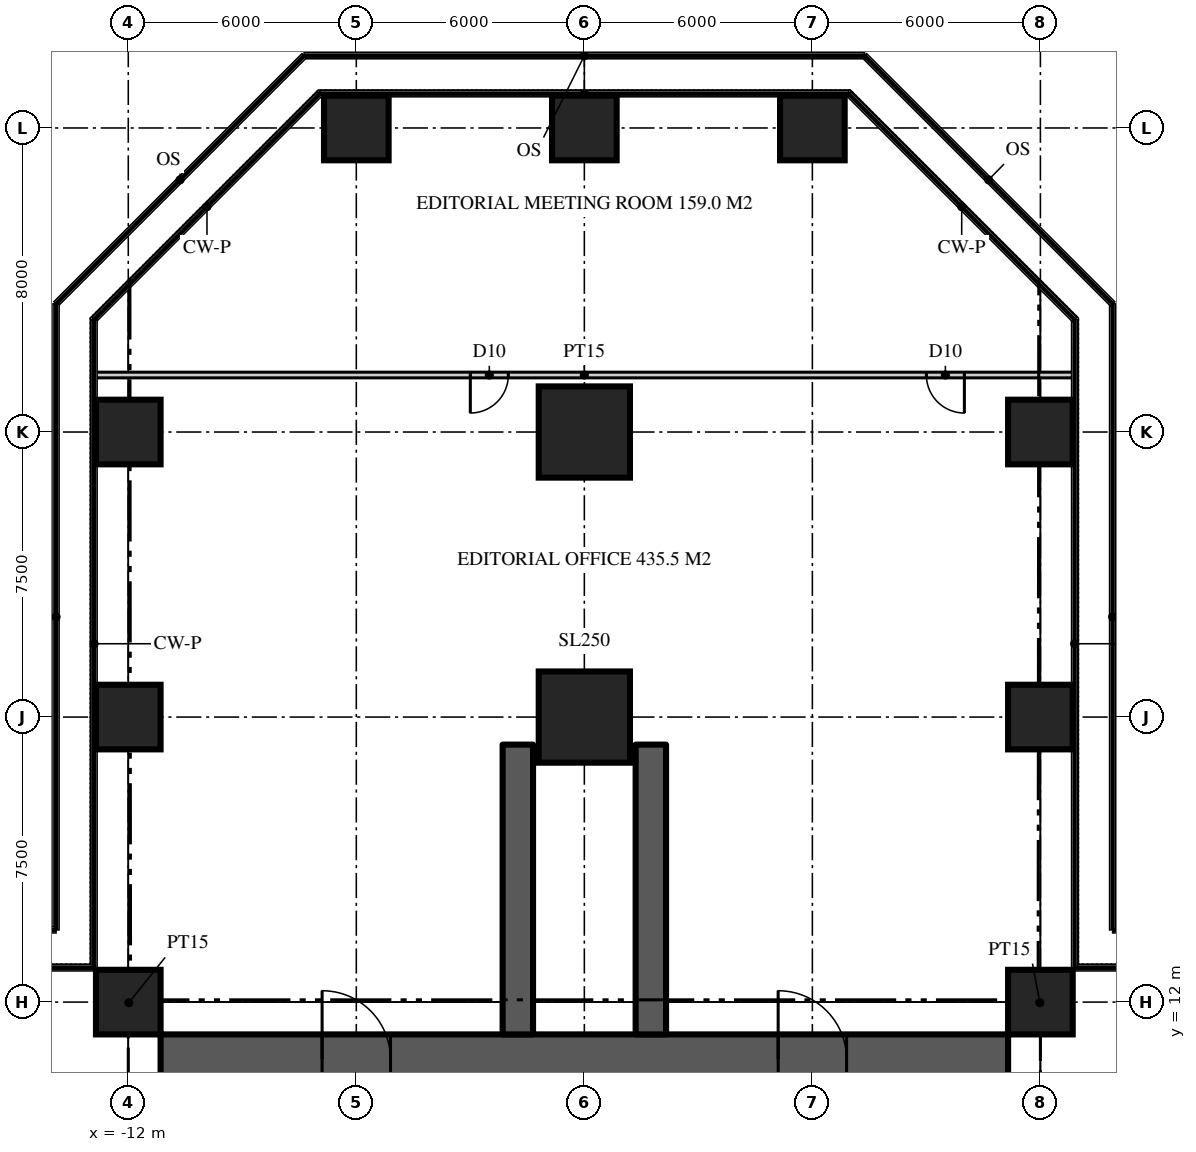
"""IFC4 building model, lengths in metres.
Left out: names, types, materials, properties, quantities, classifications, styles, units other than length and angle.
Written with IfcOpenShell. Run it as: python <this file> out.ifc"""

import sys

from ifc_helpers import new_model, si_unit, direction, frame, frame_2d, origin, origin_2d, place, context, subcontext, project, spatial, rectangle, extrude, element, fill, save


model = new_model("IFC4")
c1 = context("Model", 3, precision=1e-05, world=origin(), true_north=direction((0.0, 1.0)))
c2 = subcontext(c1, "Body", "Model", "MODEL_VIEW")
j1 = project(units=[si_unit("LENGTHUNIT", "METRE"), si_unit("PLANEANGLEUNIT", "RADIAN")], contexts=[c1])
p1 = place(None, origin())
s1 = spatial("IfcSite", under=j1, at=p1, CompositionType="ELEMENT")
p2 = place(p1, origin())
s2 = spatial("IfcBuilding", under=s1, at=p2, CompositionType="ELEMENT")
p3 = place(p2, frame((0.0, 0.0, 33.0)))
s3 = spatial("IfcBuildingStorey", under=s2, at=p3, CompositionType="ELEMENT", Elevation=33.0)
p4 = place(p3, frame((-11.15, 10.5, 0.0), z_axis=(0.0, 0.0, 1.0), x_axis=(1.0, 0.0, 0.0)))
e1 = element("IfcWall", 1, at=p4, inside=s3, PredefinedType="SHEAR", context=c2, shape_type="SweptSolid", body=[
    extrude(rectangle(XDim=22.3, YDim=1.3, at=frame_2d((11.15, 0.0))), origin(), (0.0, 0.0, 1.0), 4.5),
])
p5 = place(p4, frame((4.25, 0.0, 0.0)))
e2 = element("IfcOpeningElement", 2, at=p5, cuts=e1, PredefinedType="OPENING", context=c2, shape_type="SweptSolid", body=[
    extrude(rectangle(XDim=1.8, YDim=2.2, at=frame_2d((0.9, 1.1))), frame((0.0, 0.66, 0.0), z_axis=(0.0, -1.0, 0.0), x_axis=(1.0, 0.0, 0.0)), (0.0, 0.0, 1.0), 1.32),
])
p6 = place(p4, frame((16.25, 0.0, 0.0)))
e3 = element("IfcOpeningElement", 3, at=p6, cuts=e1, PredefinedType="OPENING", context=c2, shape_type="SweptSolid", body=[
    extrude(rectangle(XDim=1.8, YDim=2.2, at=frame_2d((0.9, 1.1))), frame((0.0, 0.66, 0.0), z_axis=(0.0, -1.0, 0.0), x_axis=(1.0, 0.0, 0.0)), (0.0, 0.0, 1.0), 1.32),
])
for number, where, z_axis, x_axis in (
    (4, (1.75, 11.15, 0.0), (0.0, 0.0, 1.0), (0.0, 1.0, 0.0)),
    (5, (-1.75, 11.15, 0.0), (0.0, 0.0, 1.0), (0.0, 1.0, 0.0)),
):
    element("IfcWall", number, at=place(p3, frame(where, z_axis=z_axis, x_axis=x_axis)), inside=s3, PredefinedType="SHEAR", context=c2, shape_type="SweptSolid", body=[
        extrude(rectangle(XDim=7.625, YDim=0.8, at=frame_2d((3.812, 0.0))), origin(), (0.0, 0.0, 1.0), 4.5),
    ])
for number, where, z_axis, x_axis in (
    (6, (-12.0, 12.0, 0.0), (0.0, 0.0, 1.0), (1.0, 0.0, 0.0)),
    (7, (12.0, 12.0, 0.0), (0.0, 0.0, 1.0), (1.0, 0.0, 0.0)),
    (8, (-12.0, 19.5, 0.0), (0.0, 0.0, 1.0), (1.0, 0.0, 0.0)),
):
    element("IfcColumn", number, at=place(p3, frame(where, z_axis=z_axis, x_axis=x_axis)), inside=s3, PredefinedType="COLUMN", context=c2, shape_type="SweptSolid", body=[
        extrude(rectangle(XDim=1.7, YDim=1.7, at=origin_2d()), origin(), (0.0, 0.0, 1.0), 4.5),
    ])
p7 = place(p3, frame((0.0, 19.5, 0.0), z_axis=(0.0, 0.0, 1.0), x_axis=(1.0, 0.0, 0.0)))
e9 = element("IfcColumn", 9, at=p7, inside=s3, PredefinedType="COLUMN", context=c2, shape_type="SweptSolid", body=[
    extrude(rectangle(XDim=2.4, YDim=2.4, at=origin_2d()), origin(), (0.0, 0.0, 1.0), 4.5),
])
for number, where, z_axis, x_axis in (
    (10, (12.0, 19.5, 0.0), (0.0, 0.0, 1.0), (1.0, 0.0, 0.0)),
    (11, (-12.0, 27.0, 0.0), (0.0, 0.0, 1.0), (1.0, 0.0, 0.0)),
):
    element("IfcColumn", number, at=place(p3, frame(where, z_axis=z_axis, x_axis=x_axis)), inside=s3, PredefinedType="COLUMN", context=c2, shape_type="SweptSolid", body=[
        extrude(rectangle(XDim=1.7, YDim=1.7, at=origin_2d()), origin(), (0.0, 0.0, 1.0), 4.5),
    ])
p8 = place(p3, frame((0.0, 27.0, 0.0), z_axis=(0.0, 0.0, 1.0), x_axis=(1.0, 0.0, 0.0)))
e12 = element("IfcColumn", 12, at=p8, inside=s3, PredefinedType="COLUMN", context=c2, shape_type="SweptSolid", body=[
    extrude(rectangle(XDim=2.4, YDim=2.4, at=origin_2d()), origin(), (0.0, 0.0, 1.0), 4.5),
])
for number, where, z_axis, x_axis in (
    (13, (12.0, 27.0, 0.0), (0.0, 0.0, 1.0), (1.0, 0.0, 0.0)),
    (14, (-6.0, 35.0, 0.0), (0.0, 0.0, 1.0), (1.0, 0.0, 0.0)),
    (15, (0.0, 35.0, 0.0), (0.0, 0.0, 1.0), (1.0, 0.0, 0.0)),
    (16, (6.0, 35.0, 0.0), (0.0, 0.0, 1.0), (1.0, 0.0, 0.0)),
):
    element("IfcColumn", number, at=place(p3, frame(where, z_axis=z_axis, x_axis=x_axis)), inside=s3, PredefinedType="COLUMN", context=c2, shape_type="SweptSolid", body=[
        extrude(rectangle(XDim=1.7, YDim=1.7, at=origin_2d()), origin(), (0.0, 0.0, 1.0), 4.5),
    ])
p9 = place(p3, frame((12.875, 28.5, 0.0), z_axis=(0.0, 0.0, 1.0), x_axis=(-1.0, 0.0, 0.0)))
e17 = element("IfcWall", 17, at=p9, inside=s3, PredefinedType="PARTITIONING", context=c2, shape_type="SweptSolid", body=[
    extrude(rectangle(XDim=25.75, YDim=0.15, at=frame_2d((12.875, 0.0))), origin(), (0.0, 0.0, 1.0), 4.25),
])
p10 = place(p9, frame((14.875, 0.0, 0.0)))
e18 = element("IfcOpeningElement", 18, at=p10, cuts=e17, PredefinedType="OPENING", context=c2, shape_type="SweptSolid", body=[
    extrude(rectangle(XDim=1.0, YDim=2.2, at=frame_2d((0.5, 1.1))), frame((0.0, 0.085, 0.0), z_axis=(0.0, -1.0, 0.0), x_axis=(1.0, 0.0, 0.0)), (0.0, 0.0, 1.0), 0.17),
])
p11 = place(p9, frame((2.875, 0.0, 0.0)))
e19 = element("IfcOpeningElement", 19, at=p11, cuts=e17, PredefinedType="OPENING", context=c2, shape_type="SweptSolid", body=[
    extrude(rectangle(XDim=1.0, YDim=2.2, at=frame_2d((0.5, 1.1))), frame((0.0, 0.085, 0.0), z_axis=(0.0, -1.0, 0.0), x_axis=(1.0, 0.0, 0.0)), (0.0, 0.0, 1.0), 0.17),
])
for number, where, z_axis, x_axis in (
    (20, (11.15, 11.15, 0.0), (0.0, 0.0, 1.0), (0.707, 0.707, 0.0)),
    (21, (-11.15, 11.15, 0.0), (0.0, 0.0, 1.0), (-0.707, 0.707, 0.0)),
):
    element("IfcWall", number, at=place(p3, frame(where, z_axis=z_axis, x_axis=x_axis)), inside=s3, PredefinedType="PARTITIONING", context=c2, shape_type="SweptSolid", body=[
        extrude(rectangle(XDim=2.362, YDim=0.15, at=frame_2d((1.181, 0.0))), origin(), (0.0, 0.0, 1.0), 4.25),
    ])
p12 = place(p5, origin())
e22 = element("IfcDoor", 22, at=p12, inside=s3, OperationType="DOUBLE_DOOR_DOUBLE_SWING", PredefinedType="DOOR", context=c2, shape_type="SweptSolid", body=[
    extrude(rectangle(XDim=1.8, YDim=2.2, at=frame_2d((0.9, 1.1))), frame((0.0, 0.025, 0.0), z_axis=(0.0, -1.0, 0.0), x_axis=(1.0, 0.0, 0.0)), (0.0, 0.0, 1.0), 0.05),
])
fill(e2, e22)
p13 = place(p6, origin())
e23 = element("IfcDoor", 23, at=p13, inside=s3, OperationType="DOUBLE_DOOR_DOUBLE_SWING", PredefinedType="DOOR", context=c2, shape_type="SweptSolid", body=[
    extrude(rectangle(XDim=1.8, YDim=2.2, at=frame_2d((0.9, 1.1))), frame((0.0, 0.025, 0.0), z_axis=(0.0, -1.0, 0.0), x_axis=(1.0, 0.0, 0.0)), (0.0, 0.0, 1.0), 0.05),
])
fill(e3, e23)
p14 = place(p10, origin())
e24 = element("IfcDoor", 24, at=p14, inside=s3, OperationType="SINGLE_SWING_RIGHT", PredefinedType="DOOR", context=c2, shape_type="SweptSolid", body=[
    extrude(rectangle(XDim=1.0, YDim=2.2, at=frame_2d((0.5, 1.1))), frame((0.0, 0.025, 0.0), z_axis=(0.0, -1.0, 0.0), x_axis=(1.0, 0.0, 0.0)), (0.0, 0.0, 1.0), 0.05),
])
fill(e18, e24)
p15 = place(p11, origin())
e25 = element("IfcDoor", 25, at=p15, inside=s3, OperationType="SINGLE_SWING_LEFT", PredefinedType="DOOR", context=c2, shape_type="SweptSolid", body=[
    extrude(rectangle(XDim=1.0, YDim=2.2, at=frame_2d((0.5, 1.1))), frame((0.0, 0.025, 0.0), z_axis=(0.0, -1.0, 0.0), x_axis=(1.0, 0.0, 0.0)), (0.0, 0.0, 1.0), 0.05),
])
fill(e19, e25)
save(model, sys.argv[1])
